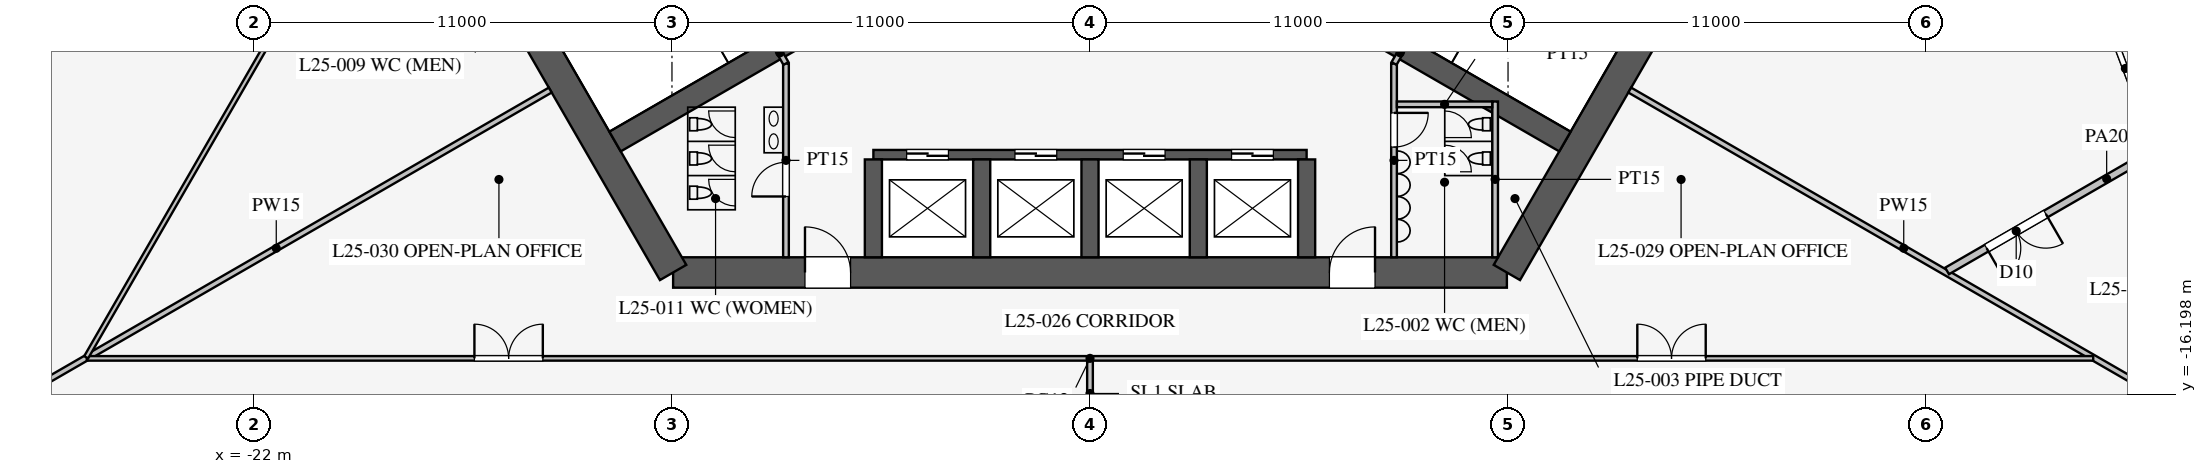
"""IFC4 building model, lengths in metres.
Left out: names, types, materials, properties, quantities, classifications, styles, units other than length and angle.
Written with IfcOpenShell. Run it as: python <this file> out.ifc"""

import sys

from ifc_helpers import new_model, si_unit, direction, frame, frame_2d, origin, place, context, subcontext, project, spatial, rectangle, extrude, element, fill, save


model = new_model("IFC4")
c1 = context("Model", 3, precision=1e-05, world=origin(), true_north=direction((0.0, 1.0)))
c2 = subcontext(c1, "Body", "Model", "MODEL_VIEW")
j1 = project(units=[si_unit("LENGTHUNIT", "METRE"), si_unit("PLANEANGLEUNIT", "RADIAN")], contexts=[c1])
p1 = place(None, origin())
s1 = spatial("IfcSite", under=j1, at=p1, CompositionType="ELEMENT")
p2 = place(p1, origin())
s2 = spatial("IfcBuilding", under=s1, at=p2, CompositionType="ELEMENT")
p3 = place(p2, frame((0.0, 0.0, 111.5)))
s3 = spatial("IfcBuildingStorey", under=s2, at=p3, CompositionType="ELEMENT", Elevation=111.5)
p4 = place(p3, frame((-10.97, -13.0, 0.0), z_axis=(0.0, 0.0, 1.0), x_axis=(1.0, 0.0, 0.0)))
e1 = element("IfcWall", 1, at=p4, inside=s3, PredefinedType="SHEAR", context=c2, shape_type="SweptSolid", body=[
    extrude(rectangle(XDim=21.939, YDim=0.8, at=frame_2d((10.97, 0.0))), origin(), (0.0, 0.0, 1.0), 4.2),
])
p5 = place(p4, frame((17.27, 0.0, 0.0)))
e2 = element("IfcOpeningElement", 2, at=p5, cuts=e1, PredefinedType="OPENING", context=c2, shape_type="SweptSolid", body=[
    extrude(rectangle(XDim=1.2, YDim=2.1, at=frame_2d((0.6, 1.05))), frame((0.0, 0.41, 0.0), z_axis=(0.0, -1.0, 0.0), x_axis=(1.0, 0.0, 0.0)), (0.0, 0.0, 1.0), 0.82),
])
p6 = place(p4, frame((3.47, 0.0, 0.0)))
e3 = element("IfcOpeningElement", 3, at=p6, cuts=e1, PredefinedType="OPENING", context=c2, shape_type="SweptSolid", body=[
    extrude(rectangle(XDim=1.2, YDim=2.1, at=frame_2d((0.6, 1.05))), frame((0.0, 0.41, 0.0), z_axis=(0.0, -1.0, 0.0), x_axis=(1.0, 0.0, 0.0)), (0.0, 0.0, 1.0), 0.82),
])
for number, where, z_axis, x_axis in (
    (4, (10.97, -13.0, 0.0), (0.0, 0.0, 1.0), (0.5, 0.866, 0.0)),
    (5, (-16.743, -3.0, 0.0), (0.0, 0.0, 1.0), (0.5, -0.866, 0.0)),
):
    element("IfcWall", number, at=place(p3, frame(where, z_axis=z_axis, x_axis=x_axis)), inside=s3, PredefinedType="SHEAR", context=c2, shape_type="SweptSolid", body=[
        extrude(rectangle(XDim=11.547, YDim=0.8, at=frame_2d((5.773, 0.0))), origin(), (0.0, 0.0, 1.0), 4.2),
    ])
p7 = place(p3, frame((-5.7, -9.9, 0.0), z_axis=(0.0, 0.0, 1.0), x_axis=(1.0, 0.0, 0.0)))
e6 = element("IfcWall", 6, at=p7, inside=s3, PredefinedType="SHEAR", context=c2, shape_type="SweptSolid", body=[
    extrude(rectangle(XDim=11.4, YDim=0.25, at=frame_2d((5.7, 0.0))), origin(), (0.0, 0.0, 1.0), 4.2),
])
p8 = place(p7, frame((0.875, 0.0, 0.0)))
e7 = element("IfcOpeningElement", 7, at=p8, cuts=e6, PredefinedType="OPENING", context=c2, shape_type="SweptSolid", body=[
    extrude(rectangle(XDim=1.1, YDim=2.2, at=frame_2d((0.55, 1.1))), frame((0.0, 0.135, 0.0), z_axis=(0.0, -1.0, 0.0), x_axis=(1.0, 0.0, 0.0)), (0.0, 0.0, 1.0), 0.27),
])
p9 = place(p7, frame((3.725, 0.0, 0.0)))
e8 = element("IfcOpeningElement", 8, at=p9, cuts=e6, PredefinedType="OPENING", context=c2, shape_type="SweptSolid", body=[
    extrude(rectangle(XDim=1.1, YDim=2.2, at=frame_2d((0.55, 1.1))), frame((0.0, 0.135, 0.0), z_axis=(0.0, -1.0, 0.0), x_axis=(1.0, 0.0, 0.0)), (0.0, 0.0, 1.0), 0.27),
])
p10 = place(p7, frame((6.575, 0.0, 0.0)))
e9 = element("IfcOpeningElement", 9, at=p10, cuts=e6, PredefinedType="OPENING", context=c2, shape_type="SweptSolid", body=[
    extrude(rectangle(XDim=1.1, YDim=2.2, at=frame_2d((0.55, 1.1))), frame((0.0, 0.135, 0.0), z_axis=(0.0, -1.0, 0.0), x_axis=(1.0, 0.0, 0.0)), (0.0, 0.0, 1.0), 0.27),
])
p11 = place(p7, frame((9.425, 0.0, 0.0)))
e10 = element("IfcOpeningElement", 10, at=p11, cuts=e6, PredefinedType="OPENING", context=c2, shape_type="SweptSolid", body=[
    extrude(rectangle(XDim=1.1, YDim=2.2, at=frame_2d((0.55, 1.1))), frame((0.0, 0.135, 0.0), z_axis=(0.0, -1.0, 0.0), x_axis=(1.0, 0.0, 0.0)), (0.0, 0.0, 1.0), 0.27),
])
for number, where, z_axis, x_axis in (
    (11, (-5.7, -10.025, 0.0), (0.0, 0.0, 1.0), (0.0, -1.0, 0.0)),
    (12, (-2.85, -10.025, 0.0), (0.0, 0.0, 1.0), (0.0, -1.0, 0.0)),
    (13, (0.0, -10.025, 0.0), (0.0, 0.0, 1.0), (0.0, -1.0, 0.0)),
    (14, (2.85, -10.025, 0.0), (0.0, 0.0, 1.0), (0.0, -1.0, 0.0)),
    (15, (5.7, -10.025, 0.0), (0.0, 0.0, 1.0), (0.0, -1.0, 0.0)),
):
    element("IfcWall", number, at=place(p3, frame(where, z_axis=z_axis, x_axis=x_axis)), inside=s3, PredefinedType="SHEAR", context=c2, shape_type="SweptSolid", body=[
        extrude(rectangle(XDim=2.575, YDim=0.45, at=frame_2d((1.288, 0.0))), origin(), (0.0, 0.0, 1.0), 4.2),
    ])
for number, where, z_axis, x_axis in (
    (16, (4.638, -5.016, 0.0), (0.0, 0.0, 1.0), (0.866, -0.5, 0.0)),
    (17, (-4.638, -5.016, 0.0), (0.0, 0.0, 1.0), (-0.866, -0.5, 0.0)),
):
    element("IfcWall", number, at=place(p3, frame(where, z_axis=z_axis, x_axis=x_axis)), inside=s3, PredefinedType="SHEAR", context=c2, shape_type="SweptSolid", body=[
        extrude(rectangle(XDim=9.075, YDim=0.6, at=frame_2d((4.538, 0.0))), origin(), (0.0, 0.0, 1.0), 4.2),
    ])
p12 = place(p3, frame((8.0, -7.5, 0.0), z_axis=(0.0, 0.0, 1.0), x_axis=(0.0, -1.0, 0.0)))
e18 = element("IfcWall", 18, at=p12, inside=s3, PredefinedType="PARTITIONING", context=c2, shape_type="SweptSolid", body=[
    extrude(rectangle(XDim=5.1, YDim=0.15, at=frame_2d((2.55, 0.0))), origin(), (0.0, 0.0, 1.0), 4.0),
])
p13 = place(p12, frame((1.3, 0.0, 0.0)))
e19 = element("IfcOpeningElement", 19, at=p13, cuts=e18, PredefinedType="OPENING", context=c2, shape_type="SweptSolid", body=[
    extrude(rectangle(XDim=0.9, YDim=2.1, at=frame_2d((0.45, 1.05))), frame((0.0, 0.085, 0.0), z_axis=(0.0, -1.0, 0.0), x_axis=(1.0, 0.0, 0.0)), (0.0, 0.0, 1.0), 0.17),
])
p14 = place(p3, frame((-8.0, -7.5, 0.0), z_axis=(0.0, 0.0, 1.0), x_axis=(0.0, -1.0, 0.0)))
e20 = element("IfcWall", 20, at=p14, inside=s3, PredefinedType="PARTITIONING", context=c2, shape_type="SweptSolid", body=[
    extrude(rectangle(XDim=5.1, YDim=0.15, at=frame_2d((2.55, 0.0))), origin(), (0.0, 0.0, 1.0), 4.0),
])
p15 = place(p14, frame((2.6, 0.0, 0.0)))
e21 = element("IfcOpeningElement", 21, at=p15, cuts=e20, PredefinedType="OPENING", context=c2, shape_type="SweptSolid", body=[
    extrude(rectangle(XDim=0.9, YDim=2.1, at=frame_2d((0.45, 1.05))), frame((0.0, 0.085, 0.0), z_axis=(0.0, -1.0, 0.0), x_axis=(1.0, 0.0, 0.0)), (0.0, 0.0, 1.0), 0.17),
])
for number, where, z_axis, x_axis in (
    (22, (8.0, -7.5, 0.0), (0.0, 0.0, 1.0), (0.5, 0.866, 0.0)),
    (23, (-8.0, -7.5, 0.0), (0.0, 0.0, 1.0), (-0.5, 0.866, 0.0)),
):
    element("IfcWall", number, at=place(p3, frame(where, z_axis=z_axis, x_axis=x_axis)), inside=s3, PredefinedType="PARTITIONING", context=c2, shape_type="SweptSolid", body=[
        extrude(rectangle(XDim=0.645, YDim=0.15, at=frame_2d((0.323, 0.0))), origin(), (0.0, 0.0, 1.0), 4.0),
    ])
p16 = place(p3, frame((10.66, -8.5, 0.0), z_axis=(0.0, 0.0, 1.0), x_axis=(0.0, -1.0, 0.0)))
e24 = element("IfcWall", 24, at=p16, inside=s3, PredefinedType="PARTITIONING", context=c2, shape_type="SweptSolid", body=[
    extrude(rectangle(XDim=4.1, YDim=0.15, at=frame_2d((2.05, 0.0))), origin(), (0.0, 0.0, 1.0), 4.0),
])
p17 = place(p3, frame((8.075, -8.575, 0.0), z_axis=(0.0, 0.0, 1.0), x_axis=(1.0, 0.0, 0.0)))
e25 = element("IfcWall", 25, at=p17, inside=s3, PredefinedType="PARTITIONING", context=c2, shape_type="SweptSolid", body=[
    extrude(rectangle(XDim=2.51, YDim=0.15, at=frame_2d((1.255, 0.0))), origin(), (0.0, 0.0, 1.0), 4.0),
])
for number, where, z_axis, x_axis in (
    (26, (14.203, -8.2, 0.0), (0.0, 0.0, 1.0), (0.866, -0.5, 0.0)),
    (27, (-14.203, -8.2, 0.0), (0.0, 0.0, 1.0), (-0.866, -0.5, 0.0)),
):
    element("IfcWall", number, at=place(p3, frame(where, z_axis=z_axis, x_axis=x_axis)), inside=s3, PredefinedType="PARTITIONING", context=c2, shape_type="SweptSolid", body=[
        extrude(rectangle(XDim=16.65, YDim=0.15, at=frame_2d((8.325, 0.0))), origin(), (0.0, 0.0, 1.0), 2.3),
    ])
p18 = place(p3, frame((0.0, -15.32, 0.0), z_axis=(0.0, 0.0, 1.0), x_axis=(0.0, -1.0, 0.0)))
e28 = element("IfcWall", 28, at=p18, inside=s3, PredefinedType="PARTITIONING", context=c2, shape_type="SweptSolid", body=[
    extrude(rectangle(XDim=9.5, YDim=0.15, at=frame_2d((4.75, 0.0))), origin(), (0.0, 0.0, 1.0), 2.8),
])
p19 = place(p3, frame((-26.398, -15.26, 0.0), z_axis=(0.0, 0.0, 1.0), x_axis=(1.0, 0.0, 0.0)))
e29 = element("IfcWall", 29, at=p19, inside=s3, PredefinedType="PARTITIONING", context=c2, shape_type="SweptSolid", body=[
    extrude(rectangle(XDim=52.796, YDim=0.12, at=frame_2d((26.398, 0.0))), origin(), (0.0, 0.0, 1.0), 2.9),
])
p20 = place(p19, frame((10.2, 0.0, 0.15)))
e30 = element("IfcOpeningElement", 30, at=p20, cuts=e29, PredefinedType="OPENING", context=c2, shape_type="SweptSolid", body=[
    extrude(rectangle(XDim=1.8, YDim=2.1, at=frame_2d((0.9, 1.05))), frame((0.0, 0.07, 0.0), z_axis=(0.0, -1.0, 0.0), x_axis=(1.0, 0.0, 0.0)), (0.0, 0.0, 1.0), 0.14),
])
p21 = place(p19, frame((40.8, 0.0, 0.15)))
e31 = element("IfcOpeningElement", 31, at=p21, cuts=e29, PredefinedType="OPENING", context=c2, shape_type="SweptSolid", body=[
    extrude(rectangle(XDim=1.8, YDim=2.1, at=frame_2d((0.9, 1.05))), frame((0.0, 0.07, 0.0), z_axis=(0.0, -1.0, 0.0), x_axis=(1.0, 0.0, 0.0)), (0.0, 0.0, 1.0), 0.14),
])
p22 = place(p3, frame((28.056, -9.783, 0.0), z_axis=(0.0, 0.0, 1.0), x_axis=(-0.352894560512, 0.93566309597, 0.0)))
e32 = element("IfcWall", 32, at=p22, inside=s3, PredefinedType="PARTITIONING", context=c2, shape_type="SweptSolid", body=[
    extrude(rectangle(XDim=4.561, YDim=0.12, at=frame_2d((2.28, 0.0))), origin(), (0.0, 0.0, 1.0), 2.9),
])
p23 = place(p22, frame((1.4, 0.0, 0.15)))
e33 = element("IfcOpeningElement", 33, at=p23, cuts=e32, PredefinedType="OPENING", context=c2, shape_type="SweptSolid", body=[
    extrude(rectangle(XDim=1.8, YDim=2.1, at=frame_2d((0.9, 1.05))), frame((0.0, 0.07, 0.0), z_axis=(0.0, -1.0, 0.0), x_axis=(1.0, 0.0, 0.0)), (0.0, 0.0, 1.0), 0.14),
])
p24 = place(p3, frame((22.553, -12.96, 0.0), z_axis=(0.0, 0.0, 1.0), x_axis=(0.866028367999, 0.499994865794, 0.0)))
e34 = element("IfcWall", 34, at=p24, inside=s3, PredefinedType="PARTITIONING", context=c2, shape_type="SweptSolid", body=[
    extrude(rectangle(XDim=9.697, YDim=0.2, at=frame_2d((4.849, 0.0))), origin(), (0.0, 0.0, 1.0), 2.9),
])
p25 = place(p24, frame((1.2, 0.0, 0.15)))
e35 = element("IfcOpeningElement", 35, at=p25, cuts=e34, PredefinedType="OPENING", context=c2, shape_type="SweptSolid", body=[
    extrude(rectangle(XDim=1.8, YDim=2.1, at=frame_2d((0.9, 1.05))), frame((0.0, 0.11, 0.0), z_axis=(0.0, -1.0, 0.0), x_axis=(1.0, 0.0, 0.0)), (0.0, 0.0, 1.0), 0.22),
])
p26 = place(p3, frame((-0.016, 30.491, 0.0), z_axis=(0.0, 0.0, 1.0), x_axis=(-0.50000091641, -0.866024874695, 0.0)))
e36 = element("IfcWall", 36, at=p26, inside=s3, PredefinedType="PARTITIONING", context=c2, shape_type="SweptSolid", body=[
    extrude(rectangle(XDim=52.796, YDim=0.12, at=frame_2d((26.398, 0.0))), origin(), (0.0, 0.0, 1.0), 2.9),
])
p27 = place(p26, frame((10.2, 0.0, 0.15)))
e37 = element("IfcOpeningElement", 37, at=p27, cuts=e36, PredefinedType="OPENING", context=c2, shape_type="SweptSolid", body=[
    extrude(rectangle(XDim=1.8, YDim=2.1, at=frame_2d((0.9, 1.05))), frame((0.0, 0.07, 0.0), z_axis=(0.0, -1.0, 0.0), x_axis=(1.0, 0.0, 0.0)), (0.0, 0.0, 1.0), 0.14),
])
p28 = place(p26, frame((40.8, 0.0, 0.15)))
e38 = element("IfcOpeningElement", 38, at=p28, cuts=e36, PredefinedType="OPENING", context=c2, shape_type="SweptSolid", body=[
    extrude(rectangle(XDim=1.8, YDim=2.1, at=frame_2d((0.9, 1.05))), frame((0.0, 0.07, 0.0), z_axis=(0.0, -1.0, 0.0), x_axis=(1.0, 0.0, 0.0)), (0.0, 0.0, 1.0), 0.14),
])
p29 = place(p13, origin())
e39 = element("IfcDoor", 39, at=p29, inside=s3, OperationType="SINGLE_SWING_LEFT", PredefinedType="DOOR", context=c2, shape_type="SweptSolid", body=[
    extrude(rectangle(XDim=0.9, YDim=2.1, at=frame_2d((0.45, 1.05))), frame((0.0, 0.025, 0.0), z_axis=(0.0, -1.0, 0.0), x_axis=(1.0, 0.0, 0.0)), (0.0, 0.0, 1.0), 0.05),
])
fill(e19, e39)
p30 = place(p15, frame((0.9, 0.0, 0.0), z_axis=(0.0, 0.0, 1.0), x_axis=(-1.0, 0.0, 0.0)))
e40 = element("IfcDoor", 40, at=p30, inside=s3, OperationType="SINGLE_SWING_LEFT", PredefinedType="DOOR", context=c2, shape_type="SweptSolid", body=[
    extrude(rectangle(XDim=0.9, YDim=2.1, at=frame_2d((0.45, 1.05))), frame((0.0, 0.025, 0.0), z_axis=(0.0, -1.0, 0.0), x_axis=(1.0, 0.0, 0.0)), (0.0, 0.0, 1.0), 0.05),
])
fill(e21, e40)
p31 = place(p5, origin())
e41 = element("IfcDoor", 41, at=p31, inside=s3, OperationType="SINGLE_SWING_RIGHT", PredefinedType="DOOR", context=c2, shape_type="SweptSolid", body=[
    extrude(rectangle(XDim=1.2, YDim=2.1, at=frame_2d((0.6, 1.05))), frame((0.0, 0.025, 0.0), z_axis=(0.0, -1.0, 0.0), x_axis=(1.0, 0.0, 0.0)), (0.0, 0.0, 1.0), 0.05),
])
fill(e2, e41)
p32 = place(p6, origin())
e42 = element("IfcDoor", 42, at=p32, inside=s3, OperationType="SINGLE_SWING_LEFT", PredefinedType="DOOR", context=c2, shape_type="SweptSolid", body=[
    extrude(rectangle(XDim=1.2, YDim=2.1, at=frame_2d((0.6, 1.05))), frame((0.0, 0.025, 0.0), z_axis=(0.0, -1.0, 0.0), x_axis=(1.0, 0.0, 0.0)), (0.0, 0.0, 1.0), 0.05),
])
fill(e3, e42)
p33 = place(p20, origin())
e43 = element("IfcDoor", 43, at=p33, inside=s3, OperationType="DOUBLE_DOOR_SINGLE_SWING", PredefinedType="DOOR", context=c2, shape_type="SweptSolid", body=[
    extrude(rectangle(XDim=1.8, YDim=2.1, at=frame_2d((0.9, 1.05))), frame((0.0, 0.025, 0.0), z_axis=(0.0, -1.0, 0.0), x_axis=(1.0, 0.0, 0.0)), (0.0, 0.0, 1.0), 0.05),
])
fill(e30, e43)
p34 = place(p21, origin())
e44 = element("IfcDoor", 44, at=p34, inside=s3, OperationType="DOUBLE_DOOR_SINGLE_SWING", PredefinedType="DOOR", context=c2, shape_type="SweptSolid", body=[
    extrude(rectangle(XDim=1.8, YDim=2.1, at=frame_2d((0.9, 1.05))), frame((0.0, 0.025, 0.0), z_axis=(0.0, -1.0, 0.0), x_axis=(1.0, 0.0, 0.0)), (0.0, 0.0, 1.0), 0.05),
])
fill(e31, e44)
p35 = place(p25, frame((1.8, 0.0, 0.0), z_axis=(0.0, 0.0, 1.0), x_axis=(-1.0, 0.0, 0.0)))
e45 = element("IfcDoor", 45, at=p35, inside=s3, OperationType="DOUBLE_DOOR_SINGLE_SWING", PredefinedType="DOOR", context=c2, shape_type="SweptSolid", body=[
    extrude(rectangle(XDim=1.8, YDim=2.1, at=frame_2d((0.9, 1.05))), frame((0.0, 0.025, 0.0), z_axis=(0.0, -1.0, 0.0), x_axis=(1.0, 0.0, 0.0)), (0.0, 0.0, 1.0), 0.05),
])
fill(e35, e45)
p36 = place(p23, frame((1.8, 0.0, 0.0), z_axis=(0.0, 0.0, 1.0), x_axis=(-1.0, 0.0, 0.0)))
e46 = element("IfcDoor", 46, at=p36, inside=s3, OperationType="DOUBLE_DOOR_SINGLE_SWING", PredefinedType="DOOR", context=c2, shape_type="SweptSolid", body=[
    extrude(rectangle(XDim=1.8, YDim=2.1, at=frame_2d((0.9, 1.05))), frame((0.0, 0.025, 0.0), z_axis=(0.0, -1.0, 0.0), x_axis=(1.0, 0.0, 0.0)), (0.0, 0.0, 1.0), 0.05),
])
fill(e33, e46)
p37 = place(p8, origin())
e47 = element("IfcDoor", 47, at=p37, inside=s3, OperationType="DOUBLE_DOOR_SLIDING", PredefinedType="DOOR", context=c2, shape_type="SweptSolid", body=[
    extrude(rectangle(XDim=1.1, YDim=2.2, at=frame_2d((0.55, 1.1))), frame((0.0, 0.025, 0.0), z_axis=(0.0, -1.0, 0.0), x_axis=(1.0, 0.0, 0.0)), (0.0, 0.0, 1.0), 0.05),
])
fill(e7, e47)
p38 = place(p9, origin())
e48 = element("IfcDoor", 48, at=p38, inside=s3, OperationType="DOUBLE_DOOR_SLIDING", PredefinedType="DOOR", context=c2, shape_type="SweptSolid", body=[
    extrude(rectangle(XDim=1.1, YDim=2.2, at=frame_2d((0.55, 1.1))), frame((0.0, 0.025, 0.0), z_axis=(0.0, -1.0, 0.0), x_axis=(1.0, 0.0, 0.0)), (0.0, 0.0, 1.0), 0.05),
])
fill(e8, e48)
p39 = place(p10, origin())
e49 = element("IfcDoor", 49, at=p39, inside=s3, OperationType="DOUBLE_DOOR_SLIDING", PredefinedType="DOOR", context=c2, shape_type="SweptSolid", body=[
    extrude(rectangle(XDim=1.1, YDim=2.2, at=frame_2d((0.55, 1.1))), frame((0.0, 0.025, 0.0), z_axis=(0.0, -1.0, 0.0), x_axis=(1.0, 0.0, 0.0)), (0.0, 0.0, 1.0), 0.05),
])
fill(e9, e49)
p40 = place(p11, origin())
e50 = element("IfcDoor", 50, at=p40, inside=s3, OperationType="DOUBLE_DOOR_SLIDING", PredefinedType="DOOR", context=c2, shape_type="SweptSolid", body=[
    extrude(rectangle(XDim=1.1, YDim=2.2, at=frame_2d((0.55, 1.1))), frame((0.0, 0.025, 0.0), z_axis=(0.0, -1.0, 0.0), x_axis=(1.0, 0.0, 0.0)), (0.0, 0.0, 1.0), 0.05),
])
fill(e10, e50)
save(model, sys.argv[1])
